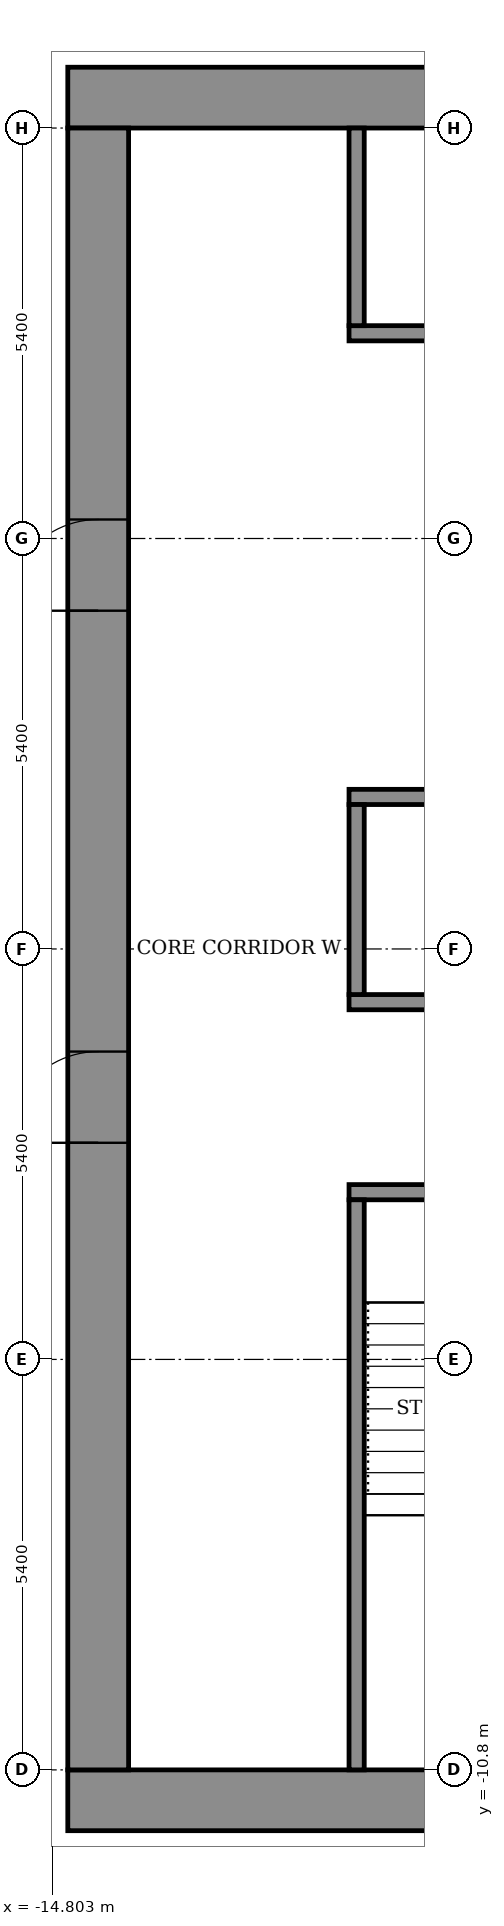
"""IFC4 building model, lengths in metres.
Left out: names, types, materials, properties, quantities, classifications, styles, units other than length and angle.
Written with IfcOpenShell. Run it as: python <this file> out.ifc"""

import sys

from ifc_helpers import new_model, si_unit, direction, frame, frame_2d, origin, place, context, subcontext, project, spatial, rectangle, extrude, element, fill, save


model = new_model("IFC4")
c1 = context("Model", 3, precision=1e-05, world=origin(), true_north=direction((0.0, 1.0)))
c2 = subcontext(c1, "Body", "Model", "MODEL_VIEW")
j1 = project(units=[si_unit("LENGTHUNIT", "METRE"), si_unit("PLANEANGLEUNIT", "RADIAN")], contexts=[c1])
p1 = place(None, origin())
s1 = spatial("IfcSite", under=j1, at=p1, CompositionType="ELEMENT")
p2 = place(p1, origin())
s2 = spatial("IfcBuilding", under=s1, at=p2, CompositionType="ELEMENT")
p3 = place(p2, frame((0.0, 0.0, 201.5)))
s3 = spatial("IfcBuildingStorey", under=s2, at=p3, CompositionType="ELEMENT", Elevation=201.5)
for number, where, z_axis, x_axis in (
    (1, (-14.6, -11.2, 0.0), (0.0, 0.0, 1.0), (1.0, 0.0, 0.0)),
    (2, (-14.6, 11.2, 0.0), (0.0, 0.0, 1.0), (1.0, 0.0, 0.0)),
):
    element("IfcWall", number, at=place(p3, frame(where, z_axis=z_axis, x_axis=x_axis)), inside=s3, PredefinedType="SHEAR", context=c2, shape_type="SweptSolid", body=[
        extrude(rectangle(XDim=29.2, YDim=0.8, at=frame_2d((14.6, 0.0))), origin(), (0.0, 0.0, 1.0), 3.6),
    ])
p4 = place(p3, frame((-14.2, -10.8, 0.0), z_axis=(0.0, 0.0, 1.0), x_axis=(0.0, 1.0, 0.0)))
e3 = element("IfcWall", 3, at=p4, inside=s3, PredefinedType="SHEAR", context=c2, shape_type="SweptSolid", body=[
    extrude(rectangle(XDim=21.6, YDim=0.8, at=frame_2d((10.8, 0.0))), origin(), (0.0, 0.0, 1.0), 3.6),
])
p5 = place(p4, frame((8.25, 0.0, 0.0)))
e4 = element("IfcOpeningElement", 4, at=p5, cuts=e3, PredefinedType="OPENING", context=c2, shape_type="SweptSolid", body=[
    extrude(rectangle(XDim=1.2, YDim=2.1, at=frame_2d((0.6, 1.05))), frame((0.0, 0.41, 0.0), z_axis=(0.0, -1.0, 0.0), x_axis=(1.0, 0.0, 0.0)), (0.0, 0.0, 1.0), 0.82),
])
p6 = place(p4, frame((15.25, 0.0, 0.0)))
e5 = element("IfcOpeningElement", 5, at=p6, cuts=e3, PredefinedType="OPENING", context=c2, shape_type="SweptSolid", body=[
    extrude(rectangle(XDim=1.2, YDim=2.1, at=frame_2d((0.6, 1.05))), frame((0.0, 0.41, 0.0), z_axis=(0.0, -1.0, 0.0), x_axis=(1.0, 0.0, 0.0)), (0.0, 0.0, 1.0), 0.82),
])
p7 = place(p3, frame((-10.9, -3.2, 0.0), z_axis=(0.0, 0.0, 1.0), x_axis=(1.0, 0.0, 0.0)))
e6 = element("IfcWall", 6, at=p7, inside=s3, PredefinedType="SHEAR", context=c2, shape_type="SweptSolid", body=[
    extrude(rectangle(XDim=21.8, YDim=0.2, at=frame_2d((10.9, 0.0))), origin(), (0.0, 0.0, 1.0), 3.05),
])
p8 = place(p7, frame((1.075, 0.0, 0.0)))
e7 = element("IfcOpeningElement", 7, at=p8, cuts=e6, PredefinedType="OPENING", context=c2, shape_type="SweptSolid", body=[
    extrude(rectangle(XDim=1.1, YDim=2.1, at=frame_2d((0.55, 1.05))), frame((0.0, 0.11, 0.0), z_axis=(0.0, -1.0, 0.0), x_axis=(1.0, 0.0, 0.0)), (0.0, 0.0, 1.0), 0.22),
])
p9 = place(p7, frame((10.325, 0.0, 0.0)))
e8 = element("IfcOpeningElement", 8, at=p9, cuts=e6, PredefinedType="OPENING", context=c2, shape_type="SweptSolid", body=[
    extrude(rectangle(XDim=1.1, YDim=2.1, at=frame_2d((0.55, 1.05))), frame((0.0, 0.11, 0.0), z_axis=(0.0, -1.0, 0.0), x_axis=(1.0, 0.0, 0.0)), (0.0, 0.0, 1.0), 0.22),
])
p10 = place(p7, frame((19.625, 0.0, 0.0)))
e9 = element("IfcOpeningElement", 9, at=p10, cuts=e6, PredefinedType="OPENING", context=c2, shape_type="SweptSolid", body=[
    extrude(rectangle(XDim=1.1, YDim=2.1, at=frame_2d((0.55, 1.05))), frame((0.0, 0.11, 0.0), z_axis=(0.0, -1.0, 0.0), x_axis=(1.0, 0.0, 0.0)), (0.0, 0.0, 1.0), 0.22),
])
p11 = place(p7, frame((5.7, 0.0, 0.0)))
e10 = element("IfcOpeningElement", 10, at=p11, cuts=e6, PredefinedType="OPENING", context=c2, shape_type="SweptSolid", body=[
    extrude(rectangle(XDim=1.1, YDim=2.1, at=frame_2d((0.55, 1.05))), frame((0.0, 0.11, 0.0), z_axis=(0.0, -1.0, 0.0), x_axis=(1.0, 0.0, 0.0)), (0.0, 0.0, 1.0), 0.22),
])
p12 = place(p7, frame((14.975, 0.0, 0.0)))
e11 = element("IfcOpeningElement", 11, at=p12, cuts=e6, PredefinedType="OPENING", context=c2, shape_type="SweptSolid", body=[
    extrude(rectangle(XDim=1.1, YDim=2.1, at=frame_2d((0.55, 1.05))), frame((0.0, 0.11, 0.0), z_axis=(0.0, -1.0, 0.0), x_axis=(1.0, 0.0, 0.0)), (0.0, 0.0, 1.0), 0.22),
])
p13 = place(p3, frame((-10.9, -0.7, 0.0), z_axis=(0.0, 0.0, 1.0), x_axis=(1.0, 0.0, 0.0)))
e12 = element("IfcWall", 12, at=p13, inside=s3, PredefinedType="SHEAR", context=c2, shape_type="SweptSolid", body=[
    extrude(rectangle(XDim=21.8, YDim=0.2, at=frame_2d((10.9, 0.0))), origin(), (0.0, 0.0, 1.0), 3.05),
])
p14 = place(p3, frame((-10.9, 2.0, 0.0), z_axis=(0.0, 0.0, 1.0), x_axis=(1.0, 0.0, 0.0)))
e13 = element("IfcWall", 13, at=p14, inside=s3, PredefinedType="SHEAR", context=c2, shape_type="SweptSolid", body=[
    extrude(rectangle(XDim=21.8, YDim=0.2, at=frame_2d((10.9, 0.0))), origin(), (0.0, 0.0, 1.0), 3.05),
])
p15 = place(p14, frame((14.4, 0.0, 0.0)))
e14 = element("IfcOpeningElement", 14, at=p15, cuts=e13, PredefinedType="OPENING", context=c2, shape_type="SweptSolid", body=[
    extrude(rectangle(XDim=1.1, YDim=2.1, at=frame_2d((0.55, 1.05))), frame((0.0, 0.11, 0.0), z_axis=(0.0, -1.0, 0.0), x_axis=(1.0, 0.0, 0.0)), (0.0, 0.0, 1.0), 0.22),
])
p16 = place(p14, frame((17.1, 0.0, 0.0)))
e15 = element("IfcOpeningElement", 15, at=p16, cuts=e13, PredefinedType="OPENING", context=c2, shape_type="SweptSolid", body=[
    extrude(rectangle(XDim=1.1, YDim=2.1, at=frame_2d((0.55, 1.05))), frame((0.0, 0.11, 0.0), z_axis=(0.0, -1.0, 0.0), x_axis=(1.0, 0.0, 0.0)), (0.0, 0.0, 1.0), 0.22),
])
p17 = place(p14, frame((19.8, 0.0, 0.0)))
e16 = element("IfcOpeningElement", 16, at=p17, cuts=e13, PredefinedType="OPENING", context=c2, shape_type="SweptSolid", body=[
    extrude(rectangle(XDim=1.1, YDim=2.1, at=frame_2d((0.55, 1.05))), frame((0.0, 0.11, 0.0), z_axis=(0.0, -1.0, 0.0), x_axis=(1.0, 0.0, 0.0)), (0.0, 0.0, 1.0), 0.22),
])
p18 = place(p14, frame((1.675, 0.0, 0.0)))
e17 = element("IfcOpeningElement", 17, at=p18, cuts=e13, PredefinedType="OPENING", context=c2, shape_type="SweptSolid", body=[
    extrude(rectangle(XDim=0.9, YDim=2.1, at=frame_2d((0.45, 1.05))), frame((0.0, 0.11, 0.0), z_axis=(0.0, -1.0, 0.0), x_axis=(1.0, 0.0, 0.0)), (0.0, 0.0, 1.0), 0.22),
])
p19 = place(p14, frame((8.425, 0.0, 0.0)))
e18 = element("IfcOpeningElement", 18, at=p19, cuts=e13, PredefinedType="OPENING", context=c2, shape_type="SweptSolid", body=[
    extrude(rectangle(XDim=0.9, YDim=2.1, at=frame_2d((0.45, 1.05))), frame((0.0, 0.11, 0.0), z_axis=(0.0, -1.0, 0.0), x_axis=(1.0, 0.0, 0.0)), (0.0, 0.0, 1.0), 0.22),
])
p20 = place(p3, frame((-10.9, 8.1, 0.0), z_axis=(0.0, 0.0, 1.0), x_axis=(1.0, 0.0, 0.0)))
e19 = element("IfcWall", 19, at=p20, inside=s3, PredefinedType="SHEAR", context=c2, shape_type="SweptSolid", body=[
    extrude(rectangle(XDim=21.8, YDim=0.2, at=frame_2d((10.9, 0.0))), origin(), (0.0, 0.0, 1.0), 3.05),
])
p21 = place(p20, frame((14.4, 0.0, 0.0)))
e20 = element("IfcOpeningElement", 20, at=p21, cuts=e19, PredefinedType="OPENING", context=c2, shape_type="SweptSolid", body=[
    extrude(rectangle(XDim=1.1, YDim=2.1, at=frame_2d((0.55, 1.05))), frame((0.0, 0.11, 0.0), z_axis=(0.0, -1.0, 0.0), x_axis=(1.0, 0.0, 0.0)), (0.0, 0.0, 1.0), 0.22),
])
p22 = place(p20, frame((17.1, 0.0, 0.0)))
e21 = element("IfcOpeningElement", 21, at=p22, cuts=e19, PredefinedType="OPENING", context=c2, shape_type="SweptSolid", body=[
    extrude(rectangle(XDim=1.1, YDim=2.1, at=frame_2d((0.55, 1.05))), frame((0.0, 0.11, 0.0), z_axis=(0.0, -1.0, 0.0), x_axis=(1.0, 0.0, 0.0)), (0.0, 0.0, 1.0), 0.22),
])
p23 = place(p20, frame((19.8, 0.0, 0.0)))
e22 = element("IfcOpeningElement", 22, at=p23, cuts=e19, PredefinedType="OPENING", context=c2, shape_type="SweptSolid", body=[
    extrude(rectangle(XDim=1.1, YDim=2.1, at=frame_2d((0.55, 1.05))), frame((0.0, 0.11, 0.0), z_axis=(0.0, -1.0, 0.0), x_axis=(1.0, 0.0, 0.0)), (0.0, 0.0, 1.0), 0.22),
])
p24 = place(p20, frame((1.675, 0.0, 0.0)))
e23 = element("IfcOpeningElement", 23, at=p24, cuts=e19, PredefinedType="OPENING", context=c2, shape_type="SweptSolid", body=[
    extrude(rectangle(XDim=0.9, YDim=2.1, at=frame_2d((0.45, 1.05))), frame((0.0, 0.11, 0.0), z_axis=(0.0, -1.0, 0.0), x_axis=(1.0, 0.0, 0.0)), (0.0, 0.0, 1.0), 0.22),
])
p25 = place(p20, frame((8.425, 0.0, 0.0)))
e24 = element("IfcOpeningElement", 24, at=p25, cuts=e19, PredefinedType="OPENING", context=c2, shape_type="SweptSolid", body=[
    extrude(rectangle(XDim=0.9, YDim=2.1, at=frame_2d((0.45, 1.05))), frame((0.0, 0.11, 0.0), z_axis=(0.0, -1.0, 0.0), x_axis=(1.0, 0.0, 0.0)), (0.0, 0.0, 1.0), 0.22),
])
p26 = place(p3, frame((-10.8, -10.8, 0.0), z_axis=(0.0, 0.0, 1.0), x_axis=(0.0, 1.0, 0.0)))
e25 = element("IfcWall", 25, at=p26, inside=s3, PredefinedType="SHEAR", context=c2, shape_type="SweptSolid", body=[
    extrude(rectangle(XDim=7.5, YDim=0.2, at=frame_2d((3.75, 0.0))), origin(), (0.0, 0.0, 1.0), 3.05),
])
p27 = place(p3, frame((-10.8, -0.6, 0.0), z_axis=(0.0, 0.0, 1.0), x_axis=(0.0, 1.0, 0.0)))
e26 = element("IfcWall", 26, at=p27, inside=s3, PredefinedType="STANDARD", context=c2, shape_type="SweptSolid", body=[
    extrude(rectangle(XDim=2.5, YDim=0.2, at=frame_2d((1.25, 0.0))), origin(), (0.0, 0.0, 1.0), 3.05),
])
p28 = place(p3, frame((-10.8, 8.2, 0.0), z_axis=(0.0, 0.0, 1.0), x_axis=(0.0, 1.0, 0.0)))
e27 = element("IfcWall", 27, at=p28, inside=s3, PredefinedType="STANDARD", context=c2, shape_type="SweptSolid", body=[
    extrude(rectangle(XDim=2.6, YDim=0.2, at=frame_2d((1.3, 0.0))), origin(), (0.0, 0.0, 1.0), 3.05),
])
p29 = place(p5, origin())
e28 = element("IfcDoor", 28, at=p29, inside=s3, OperationType="DOUBLE_DOOR_SINGLE_SWING", PredefinedType="DOOR", context=c2, shape_type="SweptSolid", body=[
    extrude(rectangle(XDim=1.2, YDim=2.1, at=frame_2d((0.6, 1.05))), frame((0.0, 0.025, 0.0), z_axis=(0.0, -1.0, 0.0), x_axis=(1.0, 0.0, 0.0)), (0.0, 0.0, 1.0), 0.05),
])
fill(e4, e28)
p30 = place(p6, origin())
e29 = element("IfcDoor", 29, at=p30, inside=s3, OperationType="DOUBLE_DOOR_SINGLE_SWING", PredefinedType="DOOR", context=c2, shape_type="SweptSolid", body=[
    extrude(rectangle(XDim=1.2, YDim=2.1, at=frame_2d((0.6, 1.05))), frame((0.0, 0.025, 0.0), z_axis=(0.0, -1.0, 0.0), x_axis=(1.0, 0.0, 0.0)), (0.0, 0.0, 1.0), 0.05),
])
fill(e5, e29)
save(model, sys.argv[1])
